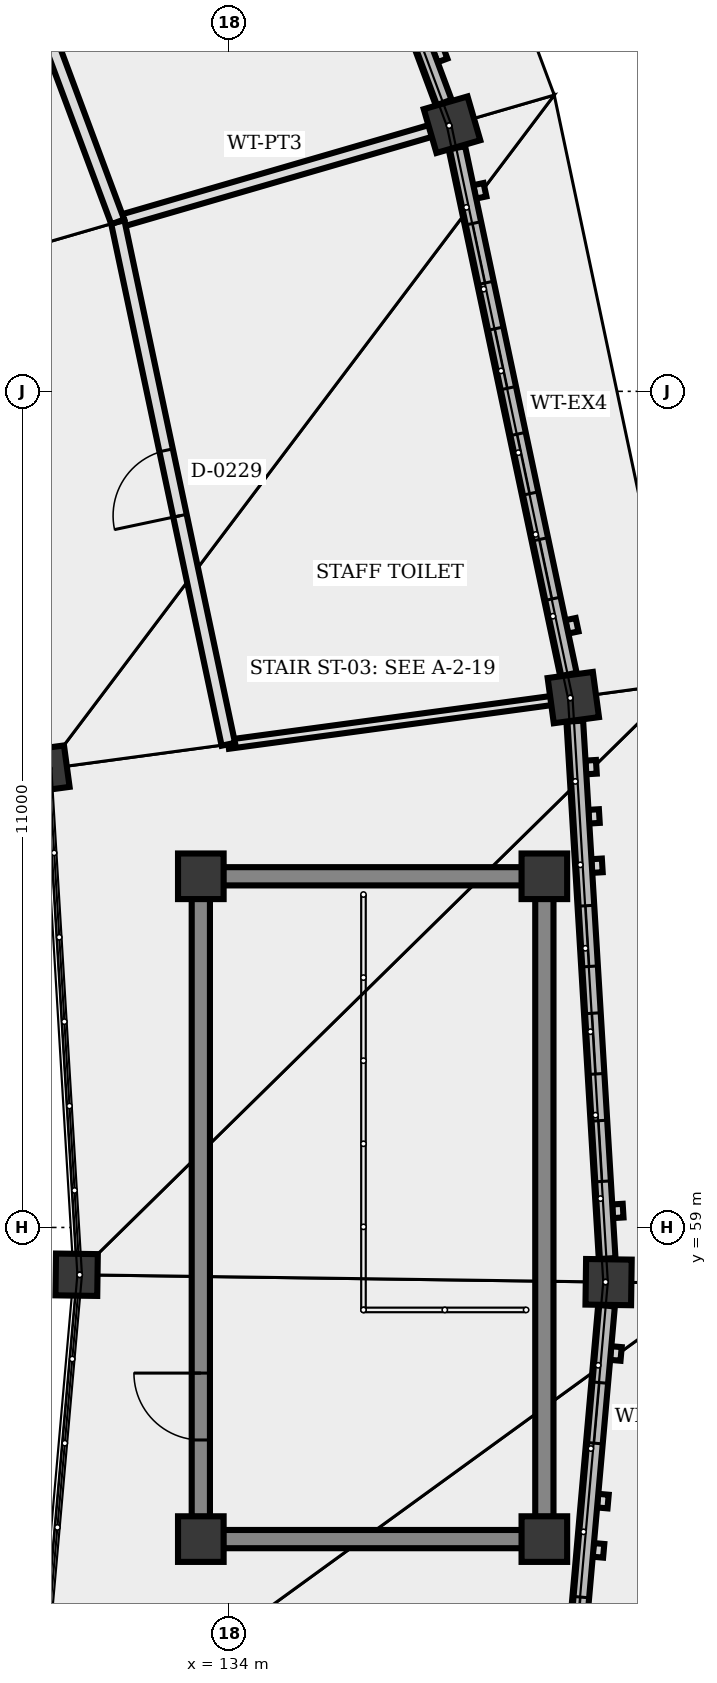
"""IFC4 building model, lengths in metres.
Left out: names, types, materials, properties, quantities, classifications, styles, units other than length and angle.
Written with IfcOpenShell. Run it as: python <this file> out.ifc"""

import sys

from ifc_helpers import new_model, si_unit, direction, frame, frame_2d, origin, origin_2d, place, context, subcontext, project, spatial, rectangle, extrude, element, fill, save


model = new_model("IFC4")
c1 = context("Model", 3, precision=1e-05, world=origin(), true_north=direction((0.0, 1.0)))
c2 = subcontext(c1, "Body", "Model", "MODEL_VIEW")
j1 = project(units=[si_unit("LENGTHUNIT", "METRE"), si_unit("PLANEANGLEUNIT", "RADIAN")], contexts=[c1])
p1 = place(None, origin())
s1 = spatial("IfcSite", under=j1, at=p1, CompositionType="ELEMENT")
p2 = place(p1, origin())
s2 = spatial("IfcBuilding", under=s1, at=p2, CompositionType="ELEMENT")
p3 = place(p2, frame((0.0, 0.0, 12.5)))
s3 = spatial("IfcBuildingStorey", under=s2, at=p3, CompositionType="ELEMENT", Elevation=12.5)
p4 = place(p3, frame((133.63, 54.9, 0.0), z_axis=(0.0, 0.0, 1.0), x_axis=(1.0, 0.0, 0.0)))
e1 = element("IfcColumn", 1, at=p4, inside=s3, PredefinedType="COLUMN", context=c2, shape_type="SweptSolid", body=[
    extrude(rectangle(XDim=0.6, YDim=0.6, at=origin_2d()), origin(), (0.0, 0.0, 1.0), 3.159),
])
for number, where, z_axis, x_axis in (
    (2, (138.15, 54.9, 0.0), (0.0, 0.0, 1.0), (1.0, 0.0, 0.0)),
    (3, (138.15, 63.62, 0.0), (0.0, 0.0, 1.0), (1.0, 0.0, 0.0)),
):
    element("IfcColumn", number, at=place(p3, frame(where, z_axis=z_axis, x_axis=x_axis)), inside=s3, PredefinedType="COLUMN", context=c2, shape_type="SweptSolid", body=[
        extrude(rectangle(XDim=0.6, YDim=0.6, at=origin_2d()), origin(), (0.0, 0.0, 1.0), 4.15),
    ])
p5 = place(p3, frame((133.63, 63.62, 0.0), z_axis=(0.0, 0.0, 1.0), x_axis=(1.0, 0.0, 0.0)))
e4 = element("IfcColumn", 4, at=p5, inside=s3, PredefinedType="COLUMN", context=c2, shape_type="SweptSolid", body=[
    extrude(rectangle(XDim=0.6, YDim=0.6, at=origin_2d()), origin(), (0.0, 0.0, 1.0), 3.17),
])
for number, where, z_axis, x_axis in (
    (5, (131.996, 58.378, 0.0), (0.0, 0.0, 1.0), (1.0, -0.014, 0.0)),
    (6, (131.594, 65.032, 0.0), (0.0, 0.0, 1.0), (0.991, 0.134, 0.0)),
):
    element("IfcColumn", number, at=place(p3, frame(where, z_axis=z_axis, x_axis=x_axis)), inside=s3, PredefinedType="COLUMN", context=c2, shape_type="SweptSolid", body=[
        extrude(rectangle(XDim=0.55, YDim=0.55, at=origin_2d()), origin(), (0.0, 0.0, 1.0), 2.64),
    ])
for number, where, z_axis, x_axis in (
    (7, (138.995, 58.281, 0.0), (0.0, 0.0, 1.0), (1.0, -0.014, 0.0)),
    (8, (138.531, 65.971, 0.0), (0.0, 0.0, 1.0), (0.991, 0.134, 0.0)),
    (9, (136.935, 73.508, 0.0), (0.0, 0.0, 1.0), (0.96, 0.279, 0.0)),
):
    element("IfcColumn", number, at=place(p3, frame(where, z_axis=z_axis, x_axis=x_axis)), inside=s3, PredefinedType="COLUMN", context=c2, shape_type="SweptSolid", body=[
        extrude(rectangle(XDim=0.6, YDim=0.6, at=origin_2d()), origin(), (0.0, 0.0, 1.0), 4.16),
    ])
p6 = place(p3, frame((138.968, 57.971, 0.0), z_axis=(0.0, 0.0, 1.0), x_axis=(-0.08798335938, -0.996121944579, 0.0)))
e10 = element("IfcWall", 10, at=p6, inside=s3, PredefinedType="SOLIDWALL", context=c2, shape_type="SweptSolid", body=[
    extrude(rectangle(XDim=7.081, YDim=0.22, at=frame_2d((3.541, 0.0))), origin(), (0.0, 0.0, 1.0), 3.537),
])
p7 = place(p6, frame((1.016, 0.0, 0.85)))
e11 = element("IfcOpeningElement", 11, at=p7, cuts=e10, PredefinedType="OPENING", context=c2, shape_type="SweptSolid", body=[
    extrude(rectangle(XDim=0.8, YDim=1.1, at=frame_2d((0.4, 0.55))), frame((0.0, 0.12, 0.0), z_axis=(0.0, -1.0, 0.0), x_axis=(1.0, 0.0, 0.0)), (0.0, 0.0, 1.0), 0.24),
])
p8 = place(p6, frame((3.849, 0.0, 0.85)))
e12 = element("IfcOpeningElement", 12, at=p8, cuts=e10, PredefinedType="OPENING", context=c2, shape_type="SweptSolid", body=[
    extrude(rectangle(XDim=0.8, YDim=1.1, at=frame_2d((0.4, 0.55))), frame((0.0, 0.12, 0.0), z_axis=(0.0, -1.0, 0.0), x_axis=(1.0, 0.0, 0.0)), (0.0, 0.0, 1.0), 0.24),
])
p9 = place(p6, frame((5.265, 0.0, 0.85)))
e13 = element("IfcOpeningElement", 13, at=p9, cuts=e10, PredefinedType="OPENING", context=c2, shape_type="SweptSolid", body=[
    extrude(rectangle(XDim=0.8, YDim=1.1, at=frame_2d((0.4, 0.55))), frame((0.0, 0.12, 0.0), z_axis=(0.0, -1.0, 0.0), x_axis=(1.0, 0.0, 0.0)), (0.0, 0.0, 1.0), 0.24),
])
p10 = place(p3, frame((138.55, 65.661, 0.0), z_axis=(0.0, 0.0, 1.0), x_axis=(0.060150575124, -0.998189314866, 0.0)))
e14 = element("IfcWall", 14, at=p10, inside=s3, PredefinedType="SOLIDWALL", context=c2, shape_type="SweptSolid", body=[
    extrude(rectangle(XDim=7.083, YDim=0.22, at=frame_2d((3.542, 0.0))), origin(), (0.0, 0.0, 1.0), 3.537),
])
p11 = place(p10, frame((2.433, 0.0, 0.85)))
e15 = element("IfcOpeningElement", 15, at=p11, cuts=e14, PredefinedType="OPENING", context=c2, shape_type="SweptSolid", body=[
    extrude(rectangle(XDim=0.8, YDim=1.1, at=frame_2d((0.4, 0.55))), frame((0.0, 0.12, 0.0), z_axis=(0.0, -1.0, 0.0), x_axis=(1.0, 0.0, 0.0)), (0.0, 0.0, 1.0), 0.24),
])
p12 = place(p10, frame((3.85, 0.0, 0.85)))
e16 = element("IfcOpeningElement", 16, at=p12, cuts=e14, PredefinedType="OPENING", context=c2, shape_type="SweptSolid", body=[
    extrude(rectangle(XDim=0.8, YDim=1.1, at=frame_2d((0.4, 0.55))), frame((0.0, 0.12, 0.0), z_axis=(0.0, -1.0, 0.0), x_axis=(1.0, 0.0, 0.0)), (0.0, 0.0, 1.0), 0.24),
])
p13 = place(p10, frame((5.266, 0.0, 0.85)))
e17 = element("IfcOpeningElement", 17, at=p13, cuts=e14, PredefinedType="OPENING", context=c2, shape_type="SweptSolid", body=[
    extrude(rectangle(XDim=0.8, YDim=1.1, at=frame_2d((0.4, 0.55))), frame((0.0, 0.12, 0.0), z_axis=(0.0, -1.0, 0.0), x_axis=(1.0, 0.0, 0.0)), (0.0, 0.0, 1.0), 0.24),
])
p14 = place(p3, frame((136.999, 73.204, 0.0), z_axis=(0.0, 0.0, 1.0), x_axis=(0.207259317734, -0.978286039567, 0.0)))
e18 = element("IfcWall", 18, at=p14, inside=s3, PredefinedType="SOLIDWALL", context=c2, shape_type="SweptSolid", body=[
    extrude(rectangle(XDim=7.083, YDim=0.22, at=frame_2d((3.542, 0.0))), origin(), (0.0, 0.0, 1.0), 3.537),
])
p15 = place(p14, frame((1.017, 0.0, 0.85)))
e19 = element("IfcOpeningElement", 19, at=p15, cuts=e18, PredefinedType="OPENING", context=c2, shape_type="SweptSolid", body=[
    extrude(rectangle(XDim=0.8, YDim=1.1, at=frame_2d((0.4, 0.55))), frame((0.0, 0.12, 0.0), z_axis=(0.0, -1.0, 0.0), x_axis=(1.0, 0.0, 0.0)), (0.0, 0.0, 1.0), 0.24),
])
p16 = place(p14, frame((2.433, 0.0, 0.85)))
e20 = element("IfcOpeningElement", 20, at=p16, cuts=e18, PredefinedType="OPENING", context=c2, shape_type="SweptSolid", body=[
    extrude(rectangle(XDim=0.8, YDim=1.1, at=frame_2d((0.4, 0.55))), frame((0.0, 0.12, 0.0), z_axis=(0.0, -1.0, 0.0), x_axis=(1.0, 0.0, 0.0)), (0.0, 0.0, 1.0), 0.24),
])
p17 = place(p14, frame((3.85, 0.0, 0.85)))
e21 = element("IfcOpeningElement", 21, at=p17, cuts=e18, PredefinedType="OPENING", context=c2, shape_type="SweptSolid", body=[
    extrude(rectangle(XDim=0.8, YDim=1.1, at=frame_2d((0.4, 0.55))), frame((0.0, 0.12, 0.0), z_axis=(0.0, -1.0, 0.0), x_axis=(1.0, 0.0, 0.0)), (0.0, 0.0, 1.0), 0.24),
])
p18 = place(p14, frame((5.266, 0.0, 0.85)))
e22 = element("IfcOpeningElement", 22, at=p18, cuts=e18, PredefinedType="OPENING", context=c2, shape_type="SweptSolid", body=[
    extrude(rectangle(XDim=0.8, YDim=1.1, at=frame_2d((0.4, 0.55))), frame((0.0, 0.12, 0.0), z_axis=(0.0, -1.0, 0.0), x_axis=(1.0, 0.0, 0.0)), (0.0, 0.0, 1.0), 0.24),
])
p19 = place(p3, frame((134.353, 80.435, 0.0), z_axis=(0.0, 0.0, 1.0), x_axis=(0.349192123714, -0.937051151611, 0.0)))
e23 = element("IfcWall", 23, at=p19, inside=s3, PredefinedType="SOLIDWALL", context=c2, shape_type="SweptSolid", body=[
    extrude(rectangle(XDim=7.082, YDim=0.22, at=frame_2d((3.541, 0.0))), origin(), (0.0, 0.0, 1.0), 3.537),
])
p20 = place(p19, frame((1.016, 0.0, 0.85)))
e24 = element("IfcOpeningElement", 24, at=p20, cuts=e23, PredefinedType="OPENING", context=c2, shape_type="SweptSolid", body=[
    extrude(rectangle(XDim=0.8, YDim=1.1, at=frame_2d((0.4, 0.55))), frame((0.0, 0.12, 0.0), z_axis=(0.0, -1.0, 0.0), x_axis=(1.0, 0.0, 0.0)), (0.0, 0.0, 1.0), 0.24),
])
p21 = place(p19, frame((2.433, 0.0, 0.85)))
e25 = element("IfcOpeningElement", 25, at=p21, cuts=e23, PredefinedType="OPENING", context=c2, shape_type="SweptSolid", body=[
    extrude(rectangle(XDim=0.8, YDim=1.1, at=frame_2d((0.4, 0.55))), frame((0.0, 0.12, 0.0), z_axis=(0.0, -1.0, 0.0), x_axis=(1.0, 0.0, 0.0)), (0.0, 0.0, 1.0), 0.24),
])
p22 = place(p19, frame((3.849, 0.0, 0.85)))
e26 = element("IfcOpeningElement", 26, at=p22, cuts=e23, PredefinedType="OPENING", context=c2, shape_type="SweptSolid", body=[
    extrude(rectangle(XDim=0.8, YDim=1.1, at=frame_2d((0.4, 0.55))), frame((0.0, 0.12, 0.0), z_axis=(0.0, -1.0, 0.0), x_axis=(1.0, 0.0, 0.0)), (0.0, 0.0, 1.0), 0.24),
])
p23 = place(p19, frame((5.265, 0.0, 0.85)))
e27 = element("IfcOpeningElement", 27, at=p23, cuts=e23, PredefinedType="OPENING", context=c2, shape_type="SweptSolid", body=[
    extrude(rectangle(XDim=0.8, YDim=1.1, at=frame_2d((0.4, 0.55))), frame((0.0, 0.12, 0.0), z_axis=(0.0, -1.0, 0.0), x_axis=(1.0, 0.0, 0.0)), (0.0, 0.0, 1.0), 0.24),
])
p24 = place(p3, frame((133.63, 55.192, 0.0), z_axis=(0.0, 0.0, 1.0), x_axis=(0.0, 1.0, 0.0)))
e28 = element("IfcWall", 28, at=p24, inside=s3, PredefinedType="SHEAR", context=c2, shape_type="SweptSolid", body=[
    extrude(rectangle(XDim=8.136, YDim=0.24, at=frame_2d((4.068, 0.0))), origin(), (0.0, 0.0, 1.0), 3.254),
])
p25 = place(p24, frame((1.012, 0.0, 0.0)))
e29 = element("IfcOpeningElement", 29, at=p25, cuts=e28, PredefinedType="OPENING", context=c2, shape_type="SweptSolid", body=[
    extrude(rectangle(XDim=0.88, YDim=2.1, at=frame_2d((0.44, 1.05))), frame((0.0, 0.13, 0.0), z_axis=(0.0, -1.0, 0.0), x_axis=(1.0, 0.0, 0.0)), (0.0, 0.0, 1.0), 0.26),
])
p26 = place(p3, frame((138.15, 63.328, 0.0), z_axis=(0.0, 0.0, 1.0), x_axis=(0.0, -1.0, 0.0)))
e30 = element("IfcWall", 30, at=p26, inside=s3, PredefinedType="SHEAR", context=c2, shape_type="SweptSolid", body=[
    extrude(rectangle(XDim=8.136, YDim=0.24, at=frame_2d((4.068, 0.0))), origin(), (0.0, 0.0, 1.0), 3.74),
])
p27 = place(p3, frame((137.858, 54.9, 0.0), z_axis=(0.0, 0.0, 1.0), x_axis=(-1.0, 0.0, 0.0)))
e31 = element("IfcWall", 31, at=p27, inside=s3, PredefinedType="SHEAR", context=c2, shape_type="SweptSolid", body=[
    extrude(rectangle(XDim=3.936, YDim=0.24, at=frame_2d((1.968, 0.0))), origin(), (0.0, 0.0, 1.0), 3.325),
])
p28 = place(p3, frame((137.858, 63.62, 0.0), z_axis=(0.0, 0.0, 1.0), x_axis=(-1.0, 0.0, 0.0)))
e32 = element("IfcWall", 32, at=p28, inside=s3, PredefinedType="SHEAR", context=c2, shape_type="SweptSolid", body=[
    extrude(rectangle(XDim=3.936, YDim=0.24, at=frame_2d((1.968, 0.0))), origin(), (0.0, 0.0, 1.0), 3.336),
])
p29 = place(p3, frame((133.992, 65.357, 0.0), z_axis=(0.0, 0.0, 1.0), x_axis=(0.990973022603, 0.134061435445, 0.0)))
e33 = element("IfcWall", 33, at=p29, inside=s3, PredefinedType="PARTITIONING", context=c2, shape_type="SweptSolid", body=[
    extrude(rectangle(XDim=4.289, YDim=0.12, at=frame_2d((2.145, 0.0))), origin(), (0.0, 0.0, 1.0), 3.397),
])
p30 = place(p3, frame((132.537, 72.23, 0.0), z_axis=(0.0, 0.0, 1.0), x_axis=(0.96025274504, 0.279131986063, 0.0)))
e34 = element("IfcWall", 34, at=p30, inside=s3, PredefinedType="PARTITIONING", context=c2, shape_type="SweptSolid", body=[
    extrude(rectangle(XDim=4.288, YDim=0.16, at=frame_2d((2.144, 0.0))), origin(), (0.0, 0.0, 1.0), 3.397),
])
p31 = place(p3, frame((133.992, 65.357, 0.0), z_axis=(0.0, 0.0, 1.0), x_axis=(-0.207083965241, 0.978323173261, 0.0)))
e35 = element("IfcWall", 35, at=p31, inside=s3, PredefinedType="PARTITIONING", context=c2, shape_type="SweptSolid", body=[
    extrude(rectangle(XDim=7.025, YDim=0.18, at=frame_2d((3.513, 0.0))), origin(), (0.0, 0.0, 1.0), 3.397),
])
p32 = place(p31, frame((3.073, 0.0, 0.0)))
e36 = element("IfcOpeningElement", 36, at=p32, cuts=e35, PredefinedType="OPENING", context=c2, shape_type="SweptSolid", body=[
    extrude(rectangle(XDim=0.88, YDim=2.1, at=frame_2d((0.44, 1.05))), frame((0.0, 0.1, 0.0), z_axis=(0.0, -1.0, 0.0), x_axis=(1.0, 0.0, 0.0)), (0.0, 0.0, 1.0), 0.2),
])
p33 = place(p3, frame((132.537, 72.23, 0.0), z_axis=(0.0, 0.0, 1.0), x_axis=(-0.349355556836, 0.936990232024, 0.0)))
e37 = element("IfcWall", 37, at=p33, inside=s3, PredefinedType="PARTITIONING", context=c2, shape_type="SweptSolid", body=[
    extrude(rectangle(XDim=7.025, YDim=0.18, at=frame_2d((3.512, 0.0))), origin(), (0.0, 0.0, 1.0), 3.397),
])
p34 = place(p33, frame((3.012, 0.0, 0.0)))
e38 = element("IfcOpeningElement", 38, at=p34, cuts=e37, PredefinedType="OPENING", context=c2, shape_type="SweptSolid", body=[
    extrude(rectangle(XDim=1.0, YDim=2.1, at=frame_2d((0.5, 1.05))), frame((0.0, 0.1, 0.0), z_axis=(0.0, -1.0, 0.0), x_axis=(1.0, 0.0, 0.0)), (0.0, 0.0, 1.0), 0.2),
])
p35 = place(p7, origin())
e39 = element("IfcWindow", 39, at=p35, inside=s3, PartitioningType="SINGLE_PANEL", PredefinedType="WINDOW", context=c2, shape_type="SweptSolid", body=[
    extrude(rectangle(XDim=0.8, YDim=1.1, at=frame_2d((0.4, 0.55))), frame((0.0, 0.03, 0.0), z_axis=(0.0, -1.0, 0.0), x_axis=(1.0, 0.0, 0.0)), (0.0, 0.0, 1.0), 0.06),
])
fill(e11, e39)
p36 = place(p8, origin())
e40 = element("IfcWindow", 40, at=p36, inside=s3, PartitioningType="SINGLE_PANEL", PredefinedType="WINDOW", context=c2, shape_type="SweptSolid", body=[
    extrude(rectangle(XDim=0.8, YDim=1.1, at=frame_2d((0.4, 0.55))), frame((0.0, 0.03, 0.0), z_axis=(0.0, -1.0, 0.0), x_axis=(1.0, 0.0, 0.0)), (0.0, 0.0, 1.0), 0.06),
])
fill(e12, e40)
p37 = place(p11, origin())
e41 = element("IfcWindow", 41, at=p37, inside=s3, PartitioningType="SINGLE_PANEL", PredefinedType="WINDOW", context=c2, shape_type="SweptSolid", body=[
    extrude(rectangle(XDim=0.8, YDim=1.1, at=frame_2d((0.4, 0.55))), frame((0.0, 0.03, 0.0), z_axis=(0.0, -1.0, 0.0), x_axis=(1.0, 0.0, 0.0)), (0.0, 0.0, 1.0), 0.06),
])
fill(e15, e41)
p38 = place(p12, origin())
e42 = element("IfcWindow", 42, at=p38, inside=s3, PartitioningType="SINGLE_PANEL", PredefinedType="WINDOW", context=c2, shape_type="SweptSolid", body=[
    extrude(rectangle(XDim=0.8, YDim=1.1, at=frame_2d((0.4, 0.55))), frame((0.0, 0.03, 0.0), z_axis=(0.0, -1.0, 0.0), x_axis=(1.0, 0.0, 0.0)), (0.0, 0.0, 1.0), 0.06),
])
fill(e16, e42)
p39 = place(p13, origin())
e43 = element("IfcWindow", 43, at=p39, inside=s3, PartitioningType="SINGLE_PANEL", PredefinedType="WINDOW", context=c2, shape_type="SweptSolid", body=[
    extrude(rectangle(XDim=0.8, YDim=1.1, at=frame_2d((0.4, 0.55))), frame((0.0, 0.03, 0.0), z_axis=(0.0, -1.0, 0.0), x_axis=(1.0, 0.0, 0.0)), (0.0, 0.0, 1.0), 0.06),
])
fill(e17, e43)
p40 = place(p15, origin())
e44 = element("IfcWindow", 44, at=p40, inside=s3, PartitioningType="SINGLE_PANEL", PredefinedType="WINDOW", context=c2, shape_type="SweptSolid", body=[
    extrude(rectangle(XDim=0.8, YDim=1.1, at=frame_2d((0.4, 0.55))), frame((0.0, 0.03, 0.0), z_axis=(0.0, -1.0, 0.0), x_axis=(1.0, 0.0, 0.0)), (0.0, 0.0, 1.0), 0.06),
])
fill(e19, e44)
p41 = place(p16, origin())
e45 = element("IfcWindow", 45, at=p41, inside=s3, PartitioningType="SINGLE_PANEL", PredefinedType="WINDOW", context=c2, shape_type="SweptSolid", body=[
    extrude(rectangle(XDim=0.8, YDim=1.1, at=frame_2d((0.4, 0.55))), frame((0.0, 0.03, 0.0), z_axis=(0.0, -1.0, 0.0), x_axis=(1.0, 0.0, 0.0)), (0.0, 0.0, 1.0), 0.06),
])
fill(e20, e45)
p42 = place(p17, origin())
e46 = element("IfcWindow", 46, at=p42, inside=s3, PartitioningType="SINGLE_PANEL", PredefinedType="WINDOW", context=c2, shape_type="SweptSolid", body=[
    extrude(rectangle(XDim=0.8, YDim=1.1, at=frame_2d((0.4, 0.55))), frame((0.0, 0.03, 0.0), z_axis=(0.0, -1.0, 0.0), x_axis=(1.0, 0.0, 0.0)), (0.0, 0.0, 1.0), 0.06),
])
fill(e21, e46)
p43 = place(p18, origin())
e47 = element("IfcWindow", 47, at=p43, inside=s3, PartitioningType="SINGLE_PANEL", PredefinedType="WINDOW", context=c2, shape_type="SweptSolid", body=[
    extrude(rectangle(XDim=0.8, YDim=1.1, at=frame_2d((0.4, 0.55))), frame((0.0, 0.03, 0.0), z_axis=(0.0, -1.0, 0.0), x_axis=(1.0, 0.0, 0.0)), (0.0, 0.0, 1.0), 0.06),
])
fill(e22, e47)
p44 = place(p25, origin())
e48 = element("IfcDoor", 48, at=p44, inside=s3, OperationType="SINGLE_SWING_RIGHT", PredefinedType="DOOR", context=c2, shape_type="SweptSolid", body=[
    extrude(rectangle(XDim=0.88, YDim=2.1, at=frame_2d((0.44, 1.05))), frame((0.0, 0.025, 0.0), z_axis=(0.0, -1.0, 0.0), x_axis=(1.0, 0.0, 0.0)), (0.0, 0.0, 1.0), 0.05),
])
fill(e29, e48)
p45 = place(p32, origin())
e49 = element("IfcDoor", 49, at=p45, inside=s3, OperationType="SINGLE_SWING_LEFT", PredefinedType="DOOR", context=c2, shape_type="SweptSolid", body=[
    extrude(rectangle(XDim=0.88, YDim=2.1, at=frame_2d((0.44, 1.05))), frame((0.0, 0.025, 0.0), z_axis=(0.0, -1.0, 0.0), x_axis=(1.0, 0.0, 0.0)), (0.0, 0.0, 1.0), 0.05),
])
fill(e36, e49)
save(model, sys.argv[1])
